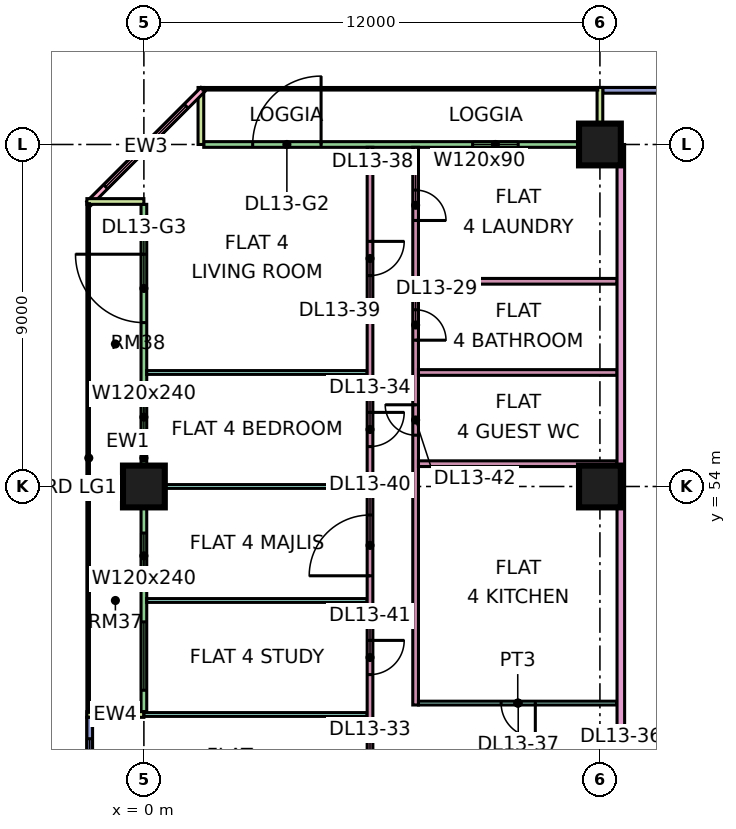
"""IFC4 building model, lengths in metres.
Left out: names, types, materials, properties, quantities, classifications, styles, units other than length and angle.
Written with IfcOpenShell. Run it as: python <this file> out.ifc"""

import sys

from ifc_helpers import new_model, si_unit, direction, frame, frame_2d, origin, origin_2d, place, context, subcontext, project, spatial, rectangle, extrude, element, fill, save


model = new_model("IFC4")
c1 = context("Model", 3, precision=1e-05, world=origin(), true_north=direction((0.0, 1.0)))
c2 = subcontext(c1, "Body", "Model", "MODEL_VIEW")
j1 = project(units=[si_unit("LENGTHUNIT", "METRE"), si_unit("PLANEANGLEUNIT", "RADIAN")], contexts=[c1])
p1 = place(None, origin())
s1 = spatial("IfcSite", under=j1, at=p1, CompositionType="ELEMENT")
p2 = place(p1, origin())
s2 = spatial("IfcBuilding", under=s1, at=p2, CompositionType="ELEMENT")
p3 = place(p2, frame((0.0, 0.0, 63.9)))
s3 = spatial("IfcBuildingStorey", under=s2, at=p3, CompositionType="ELEMENT", Elevation=63.9)
for number, where, z_axis, x_axis in (
    (1, (0.0, 54.0, 0.0), (0.0, 0.0, 1.0), (1.0, 0.0, 0.0)),
    (2, (12.0, 54.0, 0.0), (0.0, 0.0, 1.0), (1.0, 0.0, 0.0)),
    (3, (12.0, 63.0, 0.0), (0.0, 0.0, 1.0), (1.0, 0.0, 0.0)),
):
    element("IfcColumn", number, at=place(p3, frame(where, z_axis=z_axis, x_axis=x_axis)), inside=s3, PredefinedType="COLUMN", context=c2, shape_type="SweptSolid", body=[
        extrude(rectangle(XDim=1.1, YDim=1.1, at=origin_2d()), origin(), (0.0, 0.0, 1.0), 3.75),
    ])
p4 = place(p3, frame((22.5, 64.425, 0.0), z_axis=(0.0, 0.0, 1.0), x_axis=(-1.0, 0.0, 0.0)))
e4 = element("IfcWall", 4, at=p4, inside=s3, PredefinedType="SOLIDWALL", context=c2, shape_type="SweptSolid", body=[
    extrude(rectangle(XDim=10.425, YDim=0.15, at=frame_2d((5.212, 0.0))), origin(), (0.0, 0.0, 1.0), 3.35),
])
p5 = place(p4, frame((1.95, 0.0, 0.45)))
e5 = element("IfcOpeningElement", 5, at=p5, cuts=e4, PredefinedType="OPENING", context=c2, shape_type="SweptSolid", body=[
    extrude(rectangle(XDim=3.0, YDim=2.4, at=frame_2d((1.5, 1.2))), frame((0.0, 0.085, 0.0), z_axis=(0.0, -1.0, 0.0), x_axis=(1.0, 0.0, 0.0)), (0.0, 0.0, 1.0), 0.17),
])
p6 = place(p3, frame((11.925, 63.0, 0.0), z_axis=(0.0, 0.0, 1.0), x_axis=(-1.0, 0.0, 0.0)))
e6 = element("IfcWall", 6, at=p6, inside=s3, PredefinedType="SOLIDWALL", context=c2, shape_type="SweptSolid", body=[
    extrude(rectangle(XDim=10.35, YDim=0.15, at=frame_2d((5.175, 0.0))), origin(), (0.0, 0.0, 1.0), 3.35),
])
p7 = place(p6, frame((2.075, 0.0, 1.7)))
e7 = element("IfcOpeningElement", 7, at=p7, cuts=e6, PredefinedType="OPENING", context=c2, shape_type="SweptSolid", body=[
    extrude(rectangle(XDim=1.2, YDim=0.9, at=frame_2d((0.6, 0.45))), frame((0.0, 0.085, 0.0), z_axis=(0.0, -1.0, 0.0), x_axis=(1.0, 0.0, 0.0)), (0.0, 0.0, 1.0), 0.17),
])
p8 = place(p6, frame((7.262, 0.0, 0.0)))
e8 = element("IfcOpeningElement", 8, at=p8, cuts=e6, PredefinedType="OPENING", context=c2, shape_type="SweptSolid", body=[
    extrude(rectangle(XDim=1.8, YDim=2.4, at=frame_2d((0.9, 1.2))), frame((0.0, 0.085, 0.0), z_axis=(0.0, -1.0, 0.0), x_axis=(1.0, 0.0, 0.0)), (0.0, 0.0, 1.0), 0.17),
])
for number, where, z_axis, x_axis in (
    (9, (12.0, 64.5, 0.0), (0.0, 0.0, 1.0), (0.0, -1.0, 0.0)),
    (10, (1.5, 64.5, 0.0), (0.0, 0.0, 1.0), (0.0, -1.0, 0.0)),
):
    element("IfcWall", number, at=place(p3, frame(where, z_axis=z_axis, x_axis=x_axis)), inside=s3, PredefinedType="SOLIDWALL", context=c2, shape_type="SweptSolid", body=[
        extrude(rectangle(XDim=1.5, YDim=0.15, at=frame_2d((0.75, 0.0))), origin(), (0.0, 0.0, 1.0), 3.35),
    ])
p9 = place(p3, frame((1.553, 64.447, 0.0), z_axis=(0.0, 0.0, 1.0), x_axis=(-0.707106781187, -0.707106781187, 0.0)))
e11 = element("IfcWall", 11, at=p9, inside=s3, PredefinedType="SOLIDWALL", context=c2, shape_type="SweptSolid", body=[
    extrude(rectangle(XDim=4.243, YDim=0.15, at=frame_2d((2.121, 0.0))), origin(), (0.0, 0.0, 1.0), 3.35),
])
p10 = place(p9, frame((0.621, 0.0, 0.45)))
e12 = element("IfcOpeningElement", 12, at=p10, cuts=e11, PredefinedType="OPENING", context=c2, shape_type="SweptSolid", body=[
    extrude(rectangle(XDim=3.0, YDim=2.4, at=frame_2d((1.5, 1.2))), frame((0.0, 0.085, 0.0), z_axis=(0.0, -1.0, 0.0), x_axis=(1.0, 0.0, 0.0)), (0.0, 0.0, 1.0), 0.17),
])
p11 = place(p3, frame((0.0, 61.425, 0.0), z_axis=(0.0, 0.0, 1.0), x_axis=(0.0, -1.0, 0.0)))
e13 = element("IfcWall", 13, at=p11, inside=s3, PredefinedType="SOLIDWALL", context=c2, shape_type="SweptSolid", body=[
    extrude(rectangle(XDim=13.35, YDim=0.15, at=frame_2d((6.675, 0.0))), origin(), (0.0, 0.0, 1.0), 3.35),
])
p12 = place(p11, frame((1.312, 0.0, 0.0)))
e14 = element("IfcOpeningElement", 14, at=p12, cuts=e13, PredefinedType="OPENING", context=c2, shape_type="SweptSolid", body=[
    extrude(rectangle(XDim=1.8, YDim=2.4, at=frame_2d((0.9, 1.2))), frame((0.0, 0.085, 0.0), z_axis=(0.0, -1.0, 0.0), x_axis=(1.0, 0.0, 0.0)), (0.0, 0.0, 1.0), 0.17),
])
p13 = place(p11, frame((5.0, 0.0, 0.45)))
e15 = element("IfcOpeningElement", 15, at=p13, cuts=e13, PredefinedType="OPENING", context=c2, shape_type="SweptSolid", body=[
    extrude(rectangle(XDim=1.2, YDim=2.4, at=frame_2d((0.6, 1.2))), frame((0.0, 0.085, 0.0), z_axis=(0.0, -1.0, 0.0), x_axis=(1.0, 0.0, 0.0)), (0.0, 0.0, 1.0), 0.17),
])
p14 = place(p11, frame((8.65, 0.0, 0.45)))
e16 = element("IfcOpeningElement", 16, at=p14, cuts=e13, PredefinedType="OPENING", context=c2, shape_type="SweptSolid", body=[
    extrude(rectangle(XDim=1.2, YDim=2.4, at=frame_2d((0.6, 1.2))), frame((0.0, 0.085, 0.0), z_axis=(0.0, -1.0, 0.0), x_axis=(1.0, 0.0, 0.0)), (0.0, 0.0, 1.0), 0.17),
])
p15 = place(p11, frame((10.988, 0.0, 0.45)))
e17 = element("IfcOpeningElement", 17, at=p15, cuts=e13, PredefinedType="OPENING", context=c2, shape_type="SweptSolid", body=[
    extrude(rectangle(XDim=1.8, YDim=2.4, at=frame_2d((0.9, 1.2))), frame((0.0, 0.085, 0.0), z_axis=(0.0, -1.0, 0.0), x_axis=(1.0, 0.0, 0.0)), (0.0, 0.0, 1.0), 0.17),
])
for number, where, z_axis, x_axis in (
    (18, (-1.5, 61.5, 0.0), (0.0, 0.0, 1.0), (1.0, 0.0, 0.0)),
    (19, (-1.5, 48.0, 0.0), (0.0, 0.0, 1.0), (1.0, 0.0, 0.0)),
):
    element("IfcWall", number, at=place(p3, frame(where, z_axis=z_axis, x_axis=x_axis)), inside=s3, PredefinedType="SOLIDWALL", context=c2, shape_type="SweptSolid", body=[
        extrude(rectangle(XDim=1.5, YDim=0.15, at=frame_2d((0.75, 0.0))), origin(), (0.0, 0.0, 1.0), 3.35),
    ])
p16 = place(p3, frame((-1.425, 47.925, 0.0), z_axis=(0.0, 0.0, 1.0), x_axis=(0.0, -1.0, 0.0)))
e20 = element("IfcWall", 20, at=p16, inside=s3, PredefinedType="SOLIDWALL", context=c2, shape_type="SweptSolid", body=[
    extrude(rectangle(XDim=11.85, YDim=0.15, at=frame_2d((5.925, 0.0))), origin(), (0.0, 0.0, 1.0), 3.35),
])
p17 = place(p16, frame((0.562, 0.0, 0.45)))
e21 = element("IfcOpeningElement", 21, at=p17, cuts=e20, PredefinedType="OPENING", context=c2, shape_type="SweptSolid", body=[
    extrude(rectangle(XDim=1.8, YDim=2.4, at=frame_2d((0.9, 1.2))), frame((0.0, 0.085, 0.0), z_axis=(0.0, -1.0, 0.0), x_axis=(1.0, 0.0, 0.0)), (0.0, 0.0, 1.0), 0.17),
])
p18 = place(p16, frame((3.525, 0.0, 0.45)))
e22 = element("IfcOpeningElement", 22, at=p18, cuts=e20, PredefinedType="OPENING", context=c2, shape_type="SweptSolid", body=[
    extrude(rectangle(XDim=1.8, YDim=2.4, at=frame_2d((0.9, 1.2))), frame((0.0, 0.085, 0.0), z_axis=(0.0, -1.0, 0.0), x_axis=(1.0, 0.0, 0.0)), (0.0, 0.0, 1.0), 0.17),
])
p19 = place(p16, frame((6.525, 0.0, 0.45)))
e23 = element("IfcOpeningElement", 23, at=p19, cuts=e20, PredefinedType="OPENING", context=c2, shape_type="SweptSolid", body=[
    extrude(rectangle(XDim=1.8, YDim=2.4, at=frame_2d((0.9, 1.2))), frame((0.0, 0.085, 0.0), z_axis=(0.0, -1.0, 0.0), x_axis=(1.0, 0.0, 0.0)), (0.0, 0.0, 1.0), 0.17),
])
p20 = place(p16, frame((9.488, 0.0, 0.45)))
e24 = element("IfcOpeningElement", 24, at=p20, cuts=e20, PredefinedType="OPENING", context=c2, shape_type="SweptSolid", body=[
    extrude(rectangle(XDim=1.8, YDim=2.4, at=frame_2d((0.9, 1.2))), frame((0.0, 0.085, 0.0), z_axis=(0.0, -1.0, 0.0), x_axis=(1.0, 0.0, 0.0)), (0.0, 0.0, 1.0), 0.17),
])
p21 = place(p3, frame((0.0, 48.0, 0.0), z_axis=(0.0, 0.0, 1.0), x_axis=(1.0, 0.0, 0.0)))
e25 = element("IfcWall", 25, at=p21, inside=s3, PredefinedType="PARTITIONING", context=c2, shape_type="SweptSolid", body=[
    extrude(rectangle(XDim=5.875, YDim=0.1, at=frame_2d((2.938, 0.0))), origin(), (0.0, 0.0, 1.0), 3.35),
])
for number, where, z_axis, x_axis in (
    (26, (0.074, 51.0, 0.0), (0.0, 0.0, 1.0), (1.0, 0.0, 0.0)),
    (27, (0.074, 54.0, 0.0), (0.0, 0.0, 1.0), (1.0, 0.0, 0.0)),
    (28, (0.074, 57.0, 0.0), (0.0, 0.0, 1.0), (1.0, 0.0, 0.0)),
):
    element("IfcWall", number, at=place(p3, frame(where, z_axis=z_axis, x_axis=x_axis)), inside=s3, PredefinedType="PARTITIONING", context=c2, shape_type="SweptSolid", body=[
        extrude(rectangle(XDim=5.801, YDim=0.1, at=frame_2d((2.9, 0.0))), origin(), (0.0, 0.0, 1.0), 3.35),
    ])
p22 = place(p3, frame((5.95, 36.1, 0.0), z_axis=(0.0, 0.0, 1.0), x_axis=(0.0, 1.0, 0.0)))
e29 = element("IfcWall", 29, at=p22, inside=s3, PredefinedType="PARTITIONING", context=c2, shape_type="SweptSolid", body=[
    extrude(rectangle(XDim=26.826, YDim=0.15, at=frame_2d((13.413, 0.0))), origin(), (0.0, 0.0, 1.0), 3.35),
])
p23 = place(p22, frame((0.95, 0.0, 0.0)))
e30 = element("IfcOpeningElement", 30, at=p23, cuts=e29, PredefinedType="OPENING", context=c2, shape_type="SweptSolid", body=[
    extrude(rectangle(XDim=0.9, YDim=2.1, at=frame_2d((0.45, 1.05))), frame((0.0, 0.085, 0.0), z_axis=(0.0, -1.0, 0.0), x_axis=(1.0, 0.0, 0.0)), (0.0, 0.0, 1.0), 0.17),
])
p24 = place(p22, frame((3.95, 0.0, 0.0)))
e31 = element("IfcOpeningElement", 31, at=p24, cuts=e29, PredefinedType="OPENING", context=c2, shape_type="SweptSolid", body=[
    extrude(rectangle(XDim=0.9, YDim=2.1, at=frame_2d((0.45, 1.05))), frame((0.0, 0.085, 0.0), z_axis=(0.0, -1.0, 0.0), x_axis=(1.0, 0.0, 0.0)), (0.0, 0.0, 1.0), 0.17),
])
p25 = place(p22, frame((6.95, 0.0, 0.0)))
e32 = element("IfcOpeningElement", 32, at=p25, cuts=e29, PredefinedType="OPENING", context=c2, shape_type="SweptSolid", body=[
    extrude(rectangle(XDim=0.9, YDim=2.1, at=frame_2d((0.45, 1.05))), frame((0.0, 0.085, 0.0), z_axis=(0.0, -1.0, 0.0), x_axis=(1.0, 0.0, 0.0)), (0.0, 0.0, 1.0), 0.17),
])
p26 = place(p22, frame((9.95, 0.0, 0.0)))
e33 = element("IfcOpeningElement", 33, at=p26, cuts=e29, PredefinedType="OPENING", context=c2, shape_type="SweptSolid", body=[
    extrude(rectangle(XDim=0.9, YDim=2.1, at=frame_2d((0.45, 1.05))), frame((0.0, 0.085, 0.0), z_axis=(0.0, -1.0, 0.0), x_axis=(1.0, 0.0, 0.0)), (0.0, 0.0, 1.0), 0.17),
])
p27 = place(p22, frame((18.95, 0.0, 0.0)))
e34 = element("IfcOpeningElement", 34, at=p27, cuts=e29, PredefinedType="OPENING", context=c2, shape_type="SweptSolid", body=[
    extrude(rectangle(XDim=0.9, YDim=2.1, at=frame_2d((0.45, 1.05))), frame((0.0, 0.085, 0.0), z_axis=(0.0, -1.0, 0.0), x_axis=(1.0, 0.0, 0.0)), (0.0, 0.0, 1.0), 0.17),
])
p28 = place(p22, frame((23.45, 0.0, 0.0)))
e35 = element("IfcOpeningElement", 35, at=p28, cuts=e29, PredefinedType="OPENING", context=c2, shape_type="SweptSolid", body=[
    extrude(rectangle(XDim=0.9, YDim=2.1, at=frame_2d((0.45, 1.05))), frame((0.0, 0.085, 0.0), z_axis=(0.0, -1.0, 0.0), x_axis=(1.0, 0.0, 0.0)), (0.0, 0.0, 1.0), 0.17),
])
p29 = place(p22, frame((15.55, 0.0, 0.0)))
e36 = element("IfcOpeningElement", 36, at=p29, cuts=e29, PredefinedType="OPENING", context=c2, shape_type="SweptSolid", body=[
    extrude(rectangle(XDim=1.6, YDim=2.1, at=frame_2d((0.8, 1.05))), frame((0.0, 0.085, 0.0), z_axis=(0.0, -1.0, 0.0), x_axis=(1.0, 0.0, 0.0)), (0.0, 0.0, 1.0), 0.17),
])
p30 = place(p22, frame((12.95, 0.0, 0.0)))
e37 = element("IfcOpeningElement", 37, at=p30, cuts=e29, PredefinedType="OPENING", context=c2, shape_type="SweptSolid", body=[
    extrude(rectangle(XDim=0.9, YDim=2.1, at=frame_2d((0.45, 1.05))), frame((0.0, 0.085, 0.0), z_axis=(0.0, -1.0, 0.0), x_axis=(1.0, 0.0, 0.0)), (0.0, 0.0, 1.0), 0.17),
])
p31 = place(p3, frame((7.15, 48.25, 0.0), z_axis=(0.0, 0.0, 1.0), x_axis=(0.0, 1.0, 0.0)))
e38 = element("IfcWall", 38, at=p31, inside=s3, PredefinedType="PARTITIONING", context=c2, shape_type="SweptSolid", body=[
    extrude(rectangle(XDim=14.676, YDim=0.15, at=frame_2d((7.338, 0.0))), origin(), (0.0, 0.0, 1.0), 3.35),
])
p32 = place(p31, frame((9.6, 0.0, 0.0)))
e39 = element("IfcOpeningElement", 39, at=p32, cuts=e38, PredefinedType="OPENING", context=c2, shape_type="SweptSolid", body=[
    extrude(rectangle(XDim=0.8, YDim=2.1, at=frame_2d((0.4, 1.05))), frame((0.0, 0.085, 0.0), z_axis=(0.0, -1.0, 0.0), x_axis=(1.0, 0.0, 0.0)), (0.0, 0.0, 1.0), 0.17),
])
p33 = place(p31, frame((12.75, 0.0, 0.0)))
e40 = element("IfcOpeningElement", 40, at=p33, cuts=e38, PredefinedType="OPENING", context=c2, shape_type="SweptSolid", body=[
    extrude(rectangle(XDim=0.8, YDim=2.1, at=frame_2d((0.4, 1.05))), frame((0.0, 0.085, 0.0), z_axis=(0.0, -1.0, 0.0), x_axis=(1.0, 0.0, 0.0)), (0.0, 0.0, 1.0), 0.17),
])
p34 = place(p31, frame((7.1, 0.0, 0.0)))
e41 = element("IfcOpeningElement", 41, at=p34, cuts=e38, PredefinedType="OPENING", context=c2, shape_type="SweptSolid", body=[
    extrude(rectangle(XDim=0.8, YDim=2.1, at=frame_2d((0.4, 1.05))), frame((0.0, 0.085, 0.0), z_axis=(0.0, -1.0, 0.0), x_axis=(1.0, 0.0, 0.0)), (0.0, 0.0, 1.0), 0.17),
])
p35 = place(p3, frame((7.225, 48.3, 0.0), z_axis=(0.0, 0.0, 1.0), x_axis=(1.0, 0.0, 0.0)))
e42 = element("IfcWall", 42, at=p35, inside=s3, PredefinedType="PARTITIONING", context=c2, shape_type="SweptSolid", body=[
    extrude(rectangle(XDim=5.225, YDim=0.1, at=frame_2d((2.612, 0.0))), origin(), (0.0, 0.0, 1.0), 3.35),
])
p36 = place(p35, frame((2.175, 0.0, 0.0)))
e43 = element("IfcOpeningElement", 43, at=p36, cuts=e42, PredefinedType="OPENING", context=c2, shape_type="SweptSolid", body=[
    extrude(rectangle(XDim=0.9, YDim=2.1, at=frame_2d((0.45, 1.05))), frame((0.0, 0.06, 0.0), z_axis=(0.0, -1.0, 0.0), x_axis=(1.0, 0.0, 0.0)), (0.0, 0.0, 1.0), 0.12),
])
for number, where, z_axis, x_axis in (
    (44, (7.225, 54.6, 0.0), (0.0, 0.0, 1.0), (1.0, 0.0, 0.0)),
    (45, (7.225, 57.0, 0.0), (0.0, 0.0, 1.0), (1.0, 0.0, 0.0)),
    (46, (7.225, 59.4, 0.0), (0.0, 0.0, 1.0), (1.0, 0.0, 0.0)),
):
    element("IfcWall", number, at=place(p3, frame(where, z_axis=z_axis, x_axis=x_axis)), inside=s3, PredefinedType="PARTITIONING", context=c2, shape_type="SweptSolid", body=[
        extrude(rectangle(XDim=5.225, YDim=0.15, at=frame_2d((2.612, 0.0))), origin(), (0.0, 0.0, 1.0), 3.35),
    ])
p37 = place(p3, frame((12.55, 20.0, 0.0), z_axis=(0.0, 0.0, 1.0), x_axis=(0.0, 1.0, 0.0)))
e47 = element("IfcWall", 47, at=p37, inside=s3, PredefinedType="PARTITIONING", context=c2, shape_type="SweptSolid", body=[
    extrude(rectangle(XDim=43.0, YDim=0.2, at=frame_2d((21.5, 0.0))), origin(), (0.0, 0.0, 1.0), 3.35),
])
p38 = place(p37, frame((25.8, 0.0, 0.0)))
e48 = element("IfcOpeningElement", 48, at=p38, cuts=e47, PredefinedType="OPENING", context=c2, shape_type="SweptSolid", body=[
    extrude(rectangle(XDim=1.0, YDim=2.1, at=frame_2d((0.5, 1.05))), frame((0.0, 0.11, 0.0), z_axis=(0.0, -1.0, 0.0), x_axis=(1.0, 0.0, 0.0)), (0.0, 0.0, 1.0), 0.22),
])
p39 = place(p37, frame((0.6, 0.0, 0.0)))
e49 = element("IfcOpeningElement", 49, at=p39, cuts=e47, PredefinedType="OPENING", context=c2, shape_type="SweptSolid", body=[
    extrude(rectangle(XDim=1.2, YDim=2.1, at=frame_2d((0.6, 1.05))), frame((0.0, 0.11, 0.0), z_axis=(0.0, -1.0, 0.0), x_axis=(1.0, 0.0, 0.0)), (0.0, 0.0, 1.0), 0.22),
])
p40 = place(p37, frame((14.25, 0.0, 0.0)))
e50 = element("IfcOpeningElement", 50, at=p40, cuts=e47, PredefinedType="OPENING", context=c2, shape_type="SweptSolid", body=[
    extrude(rectangle(XDim=1.0, YDim=2.1, at=frame_2d((0.5, 1.05))), frame((0.0, 0.11, 0.0), z_axis=(0.0, -1.0, 0.0), x_axis=(1.0, 0.0, 0.0)), (0.0, 0.0, 1.0), 0.22),
])
p41 = place(p7, origin())
e51 = element("IfcWindow", 51, at=p41, inside=s3, PartitioningType="SINGLE_PANEL", PredefinedType="WINDOW", context=c2, shape_type="SweptSolid", body=[
    extrude(rectangle(XDim=1.2, YDim=0.9, at=frame_2d((0.6, 0.45))), frame((0.0, 0.03, 0.0), z_axis=(0.0, -1.0, 0.0), x_axis=(1.0, 0.0, 0.0)), (0.0, 0.0, 1.0), 0.06),
])
fill(e7, e51)
p42 = place(p8, frame((1.8, 0.0, 0.0), z_axis=(0.0, 0.0, 1.0), x_axis=(-1.0, 0.0, 0.0)))
e52 = element("IfcDoor", 52, at=p42, inside=s3, OperationType="DOUBLE_DOOR_SINGLE_SWING", PredefinedType="DOOR", context=c2, shape_type="SweptSolid", body=[
    extrude(rectangle(XDim=1.8, YDim=2.4, at=frame_2d((0.9, 1.2))), frame((0.0, 0.025, 0.0), z_axis=(0.0, -1.0, 0.0), x_axis=(1.0, 0.0, 0.0)), (0.0, 0.0, 1.0), 0.05),
])
fill(e8, e52)
p43 = place(p10, origin())
e53 = element("IfcWindow", 53, at=p43, inside=s3, PartitioningType="SINGLE_PANEL", PredefinedType="WINDOW", context=c2, shape_type="SweptSolid", body=[
    extrude(rectangle(XDim=3.0, YDim=2.4, at=frame_2d((1.5, 1.2))), frame((0.0, 0.03, 0.0), z_axis=(0.0, -1.0, 0.0), x_axis=(1.0, 0.0, 0.0)), (0.0, 0.0, 1.0), 0.06),
])
fill(e12, e53)
p44 = place(p12, frame((1.8, 0.0, 0.0), z_axis=(0.0, 0.0, 1.0), x_axis=(-1.0, 0.0, 0.0)))
e54 = element("IfcDoor", 54, at=p44, inside=s3, OperationType="DOUBLE_DOOR_SINGLE_SWING", PredefinedType="DOOR", context=c2, shape_type="SweptSolid", body=[
    extrude(rectangle(XDim=1.8, YDim=2.4, at=frame_2d((0.9, 1.2))), frame((0.0, 0.025, 0.0), z_axis=(0.0, -1.0, 0.0), x_axis=(1.0, 0.0, 0.0)), (0.0, 0.0, 1.0), 0.05),
])
fill(e14, e54)
p45 = place(p13, origin())
e55 = element("IfcWindow", 55, at=p45, inside=s3, PartitioningType="SINGLE_PANEL", PredefinedType="WINDOW", context=c2, shape_type="SweptSolid", body=[
    extrude(rectangle(XDim=1.2, YDim=2.4, at=frame_2d((0.6, 1.2))), frame((0.0, 0.03, 0.0), z_axis=(0.0, -1.0, 0.0), x_axis=(1.0, 0.0, 0.0)), (0.0, 0.0, 1.0), 0.06),
])
fill(e15, e55)
p46 = place(p14, origin())
e56 = element("IfcWindow", 56, at=p46, inside=s3, PartitioningType="SINGLE_PANEL", PredefinedType="WINDOW", context=c2, shape_type="SweptSolid", body=[
    extrude(rectangle(XDim=1.2, YDim=2.4, at=frame_2d((0.6, 1.2))), frame((0.0, 0.03, 0.0), z_axis=(0.0, -1.0, 0.0), x_axis=(1.0, 0.0, 0.0)), (0.0, 0.0, 1.0), 0.06),
])
fill(e16, e56)
p47 = place(p15, origin())
e57 = element("IfcWindow", 57, at=p47, inside=s3, PartitioningType="SINGLE_PANEL", PredefinedType="WINDOW", context=c2, shape_type="SweptSolid", body=[
    extrude(rectangle(XDim=1.8, YDim=2.4, at=frame_2d((0.9, 1.2))), frame((0.0, 0.03, 0.0), z_axis=(0.0, -1.0, 0.0), x_axis=(1.0, 0.0, 0.0)), (0.0, 0.0, 1.0), 0.06),
])
fill(e17, e57)
p48 = place(p17, origin())
e58 = element("IfcWindow", 58, at=p48, inside=s3, PartitioningType="SINGLE_PANEL", PredefinedType="WINDOW", context=c2, shape_type="SweptSolid", body=[
    extrude(rectangle(XDim=1.8, YDim=2.4, at=frame_2d((0.9, 1.2))), frame((0.0, 0.03, 0.0), z_axis=(0.0, -1.0, 0.0), x_axis=(1.0, 0.0, 0.0)), (0.0, 0.0, 1.0), 0.06),
])
fill(e21, e58)
p49 = place(p32, frame((0.8, 0.0, 0.0), z_axis=(0.0, 0.0, 1.0), x_axis=(-1.0, 0.0, 0.0)))
e59 = element("IfcDoor", 59, at=p49, inside=s3, OperationType="SINGLE_SWING_LEFT", PredefinedType="DOOR", context=c2, shape_type="SweptSolid", body=[
    extrude(rectangle(XDim=0.8, YDim=2.1, at=frame_2d((0.4, 1.05))), frame((0.0, 0.025, 0.0), z_axis=(0.0, -1.0, 0.0), x_axis=(1.0, 0.0, 0.0)), (0.0, 0.0, 1.0), 0.05),
])
fill(e39, e59)
p50 = place(p27, origin())
e60 = element("IfcDoor", 60, at=p50, inside=s3, OperationType="SINGLE_SWING_RIGHT", PredefinedType="DOOR", context=c2, shape_type="SweptSolid", body=[
    extrude(rectangle(XDim=0.9, YDim=2.1, at=frame_2d((0.45, 1.05))), frame((0.0, 0.025, 0.0), z_axis=(0.0, -1.0, 0.0), x_axis=(1.0, 0.0, 0.0)), (0.0, 0.0, 1.0), 0.05),
])
fill(e34, e60)
p51 = place(p36, origin())
e61 = element("IfcDoor", 61, at=p51, inside=s3, OperationType="SINGLE_SWING_RIGHT", PredefinedType="DOOR", context=c2, shape_type="SweptSolid", body=[
    extrude(rectangle(XDim=0.9, YDim=2.1, at=frame_2d((0.45, 1.05))), frame((0.0, 0.025, 0.0), z_axis=(0.0, -1.0, 0.0), x_axis=(1.0, 0.0, 0.0)), (0.0, 0.0, 1.0), 0.05),
])
fill(e43, e61)
p52 = place(p33, frame((0.8, 0.0, 0.0), z_axis=(0.0, 0.0, 1.0), x_axis=(-1.0, 0.0, 0.0)))
e62 = element("IfcDoor", 62, at=p52, inside=s3, OperationType="SINGLE_SWING_LEFT", PredefinedType="DOOR", context=c2, shape_type="SweptSolid", body=[
    extrude(rectangle(XDim=0.8, YDim=2.1, at=frame_2d((0.4, 1.05))), frame((0.0, 0.025, 0.0), z_axis=(0.0, -1.0, 0.0), x_axis=(1.0, 0.0, 0.0)), (0.0, 0.0, 1.0), 0.05),
])
fill(e40, e62)
p53 = place(p28, origin())
e63 = element("IfcDoor", 63, at=p53, inside=s3, OperationType="SINGLE_SWING_RIGHT", PredefinedType="DOOR", context=c2, shape_type="SweptSolid", body=[
    extrude(rectangle(XDim=0.9, YDim=2.1, at=frame_2d((0.45, 1.05))), frame((0.0, 0.025, 0.0), z_axis=(0.0, -1.0, 0.0), x_axis=(1.0, 0.0, 0.0)), (0.0, 0.0, 1.0), 0.05),
])
fill(e35, e63)
p54 = place(p29, origin())
e64 = element("IfcDoor", 64, at=p54, inside=s3, OperationType="DOUBLE_DOOR_SINGLE_SWING", PredefinedType="DOOR", context=c2, shape_type="SweptSolid", body=[
    extrude(rectangle(XDim=1.6, YDim=2.1, at=frame_2d((0.8, 1.05))), frame((0.0, 0.025, 0.0), z_axis=(0.0, -1.0, 0.0), x_axis=(1.0, 0.0, 0.0)), (0.0, 0.0, 1.0), 0.05),
])
fill(e36, e64)
p55 = place(p30, origin())
e65 = element("IfcDoor", 65, at=p55, inside=s3, OperationType="SINGLE_SWING_RIGHT", PredefinedType="DOOR", context=c2, shape_type="SweptSolid", body=[
    extrude(rectangle(XDim=0.9, YDim=2.1, at=frame_2d((0.45, 1.05))), frame((0.0, 0.025, 0.0), z_axis=(0.0, -1.0, 0.0), x_axis=(1.0, 0.0, 0.0)), (0.0, 0.0, 1.0), 0.05),
])
fill(e37, e65)
p56 = place(p34, frame((0.8, 0.0, 0.0), z_axis=(0.0, 0.0, 1.0), x_axis=(-1.0, 0.0, 0.0)))
e66 = element("IfcDoor", 66, at=p56, inside=s3, OperationType="SINGLE_SWING_RIGHT", PredefinedType="DOOR", context=c2, shape_type="SweptSolid", body=[
    extrude(rectangle(XDim=0.8, YDim=2.1, at=frame_2d((0.4, 1.05))), frame((0.0, 0.025, 0.0), z_axis=(0.0, -1.0, 0.0), x_axis=(1.0, 0.0, 0.0)), (0.0, 0.0, 1.0), 0.05),
])
fill(e41, e66)
save(model, sys.argv[1])
